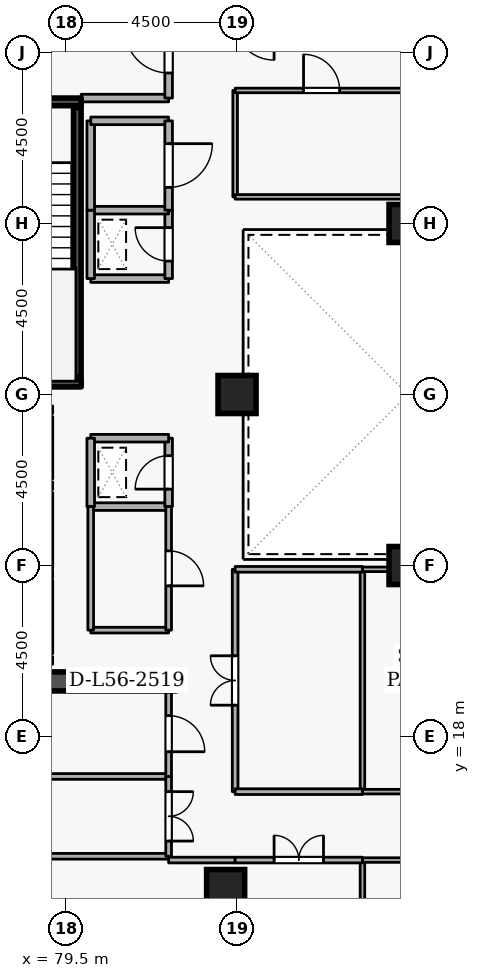
"""IFC4 building model, lengths in metres.
Left out: names, types, materials, properties, quantities, classifications, styles, units other than length and angle.
Written with IfcOpenShell. Run it as: python <this file> out.ifc"""

import sys

from ifc_helpers import new_model, si_unit, direction, frame, frame_2d, origin, origin_2d, place, context, subcontext, project, spatial, rectangle, extrude, element, fill, save


model = new_model("IFC4")
c1 = context("Model", 3, precision=1e-05, world=origin(), true_north=direction((0.0, 1.0)))
c2 = subcontext(c1, "Body", "Model", "MODEL_VIEW")
j1 = project(units=[si_unit("LENGTHUNIT", "METRE"), si_unit("PLANEANGLEUNIT", "RADIAN")], contexts=[c1])
p1 = place(None, origin())
s1 = spatial("IfcSite", under=j1, at=p1, CompositionType="ELEMENT")
p2 = place(p1, origin())
s2 = spatial("IfcBuilding", under=s1, at=p2, CompositionType="ELEMENT")
p3 = place(p2, frame((0.0, 0.0, 210.9)))
s3 = spatial("IfcBuildingStorey", under=s2, at=p3, CompositionType="ELEMENT", Elevation=210.9)
p4 = place(p3, frame((76.6, 19.45, 0.0), z_axis=(0.0, 0.0, 1.0), x_axis=(1.0, 0.0, 0.0)))
e1 = element("IfcWall", 1, at=p4, inside=s3, PredefinedType="SHEAR", context=c2, shape_type="SweptSolid", body=[
    extrude(rectangle(XDim=5.8, YDim=0.5, at=frame_2d((2.9, 0.0))), origin(), (0.0, 0.0, 1.0), 3.6),
])
for number, where, z_axis, x_axis in (
    (2, (83.7, 14.0, 0.0), (0.0, 0.0, 1.0), (1.0, 0.0, 0.0)),
    (3, (84.0, 27.0, 0.0), (0.0, 0.0, 1.0), (1.0, 0.0, 0.0)),
    (4, (88.5, 22.5, 0.0), (0.0, 0.0, 1.0), (1.0, 0.0, 0.0)),
    (5, (88.5, 31.5, 0.0), (0.0, 0.0, 1.0), (1.0, 0.0, 0.0)),
):
    element("IfcColumn", number, at=place(p3, frame(where, z_axis=z_axis, x_axis=x_axis)), inside=s3, PredefinedType="COLUMN", context=c2, shape_type="SweptSolid", body=[
        extrude(rectangle(XDim=1.0, YDim=1.0, at=origin_2d()), origin(), (0.0, 0.0, 1.0), 3.6),
    ])
p5 = place(p3, frame((79.05, 24.78, 0.0), z_axis=(0.0, 0.0, 1.0), x_axis=(0.0, 1.0, 0.0)))
e6 = element("IfcWall", 6, at=p5, inside=s3, PredefinedType="STANDARD", context=c2, shape_type="SweptSolid", body=[
    extrude(rectangle(XDim=1.64, YDim=0.2, at=frame_2d((0.82, 0.0))), origin(), (0.0, 0.0, 1.0), 3.34),
])
p6 = place(p5, frame((0.31, 0.0, 0.0)))
e7 = element("IfcOpeningElement", 7, at=p6, cuts=e6, PredefinedType="OPENING", context=c2, shape_type="SweptSolid", body=[
    extrude(rectangle(XDim=1.02, YDim=2.06, at=frame_2d((0.51, 1.03))), frame((0.0, 0.11, 0.0), z_axis=(0.0, -1.0, 0.0), x_axis=(1.0, 0.0, 0.0)), (0.0, 0.0, 1.0), 0.22),
])
p7 = place(p3, frame((79.05, 22.43, 0.0), z_axis=(0.0, 0.0, 1.0), x_axis=(0.0, 1.0, 0.0)))
e8 = element("IfcWall", 8, at=p7, inside=s3, PredefinedType="STANDARD", context=c2, shape_type="SweptSolid", body=[
    extrude(rectangle(XDim=1.99, YDim=0.2, at=frame_2d((0.995, 0.0))), origin(), (0.0, 0.0, 1.0), 3.34),
])
p8 = place(p7, frame((0.485, 0.0, 0.0)))
e9 = element("IfcOpeningElement", 9, at=p8, cuts=e8, PredefinedType="OPENING", context=c2, shape_type="SweptSolid", body=[
    extrude(rectangle(XDim=1.02, YDim=2.06, at=frame_2d((0.51, 1.03))), frame((0.0, 0.11, 0.0), z_axis=(0.0, -1.0, 0.0), x_axis=(1.0, 0.0, 0.0)), (0.0, 0.0, 1.0), 0.22),
])
p9 = place(p3, frame((79.05, 20.18, 0.0), z_axis=(0.0, 0.0, 1.0), x_axis=(0.0, 1.0, 0.0)))
e10 = element("IfcWall", 10, at=p9, inside=s3, PredefinedType="STANDARD", context=c2, shape_type="SweptSolid", body=[
    extrude(rectangle(XDim=1.94, YDim=0.2, at=frame_2d((0.97, 0.0))), origin(), (0.0, 0.0, 1.0), 3.34),
])
p10 = place(p9, frame((0.46, 0.0, 0.0)))
e11 = element("IfcOpeningElement", 11, at=p10, cuts=e10, PredefinedType="OPENING", context=c2, shape_type="SweptSolid", body=[
    extrude(rectangle(XDim=1.02, YDim=2.06, at=frame_2d((0.51, 1.03))), frame((0.0, 0.11, 0.0), z_axis=(0.0, -1.0, 0.0), x_axis=(1.0, 0.0, 0.0)), (0.0, 0.0, 1.0), 0.22),
])
p11 = place(p3, frame((76.55, 34.7, 0.0), z_axis=(0.0, 0.0, 1.0), x_axis=(1.0, 0.0, 0.0)))
e12 = element("IfcWall", 12, at=p11, inside=s3, PredefinedType="SHEAR", context=c2, shape_type="SweptSolid", body=[
    extrude(rectangle(XDim=3.35, YDim=0.2, at=frame_2d((1.675, 0.0))), origin(), (0.0, 0.0, 1.0), 3.6),
])
p12 = place(p11, frame((1.125, 0.0, 0.0)))
e13 = element("IfcOpeningElement", 13, at=p12, cuts=e12, PredefinedType="OPENING", context=c2, shape_type="SweptSolid", body=[
    extrude(rectangle(XDim=1.1, YDim=2.1, at=frame_2d((0.55, 1.05))), frame((0.0, 0.11, 0.0), z_axis=(0.0, -1.0, 0.0), x_axis=(1.0, 0.0, 0.0)), (0.0, 0.0, 1.0), 0.22),
])
p13 = place(p3, frame((79.9, 27.3, 0.0), z_axis=(0.0, 0.0, 1.0), x_axis=(-1.0, 0.0, 0.0)))
e14 = element("IfcWall", 14, at=p13, inside=s3, PredefinedType="SHEAR", context=c2, shape_type="SweptSolid", body=[
    extrude(rectangle(XDim=3.35, YDim=0.2, at=frame_2d((1.675, 0.0))), origin(), (0.0, 0.0, 1.0), 3.6),
])
p14 = place(p3, frame((79.797, 27.45, 0.0), z_axis=(0.0, 0.0, 1.0), x_axis=(0.0, 1.0, 0.0)))
e15 = element("IfcWall", 15, at=p14, inside=s3, PredefinedType="SHEAR", context=c2, shape_type="SweptSolid", body=[
    extrude(rectangle(XDim=7.1, YDim=0.2, at=frame_2d((3.55, 0.0))), origin(), (0.0, 0.0, 1.0), 3.6),
])
p15 = place(p3, frame((79.9, 34.8, 0.0), z_axis=(0.0, 0.0, 1.0), x_axis=(1.0, 0.0, 0.0)))
e16 = element("IfcWall", 16, at=p15, inside=s3, PredefinedType="STANDARD", context=c2, shape_type="SweptSolid", body=[
    extrude(rectangle(XDim=2.3, YDim=0.2, at=frame_2d((1.15, 0.0))), origin(), (0.0, 0.0, 1.0), 2.545),
])
p16 = place(p3, frame((82.2, 34.8, 0.0), z_axis=(0.0, 0.0, 1.0), x_axis=(0.0, 1.0, 0.0)))
e17 = element("IfcWall", 17, at=p16, inside=s3, PredefinedType="STANDARD", context=c2, shape_type="SweptSolid", body=[
    extrude(rectangle(XDim=2.5, YDim=0.2, at=frame_2d((1.25, 0.0))), origin(), (0.0, 0.0, 1.0), 3.34),
])
p17 = place(p16, frame((0.66, 0.0, 0.0)))
e18 = element("IfcOpeningElement", 18, at=p17, cuts=e17, PredefinedType="OPENING", context=c2, shape_type="SweptSolid", body=[
    extrude(rectangle(XDim=1.15, YDim=2.1, at=frame_2d((0.575, 1.05))), frame((0.0, 0.11, 0.0), z_axis=(0.0, -1.0, 0.0), x_axis=(1.0, 0.0, 0.0)), (0.0, 0.0, 1.0), 0.22),
])
p18 = place(p3, frame((80.15, 24.05, 0.0), z_axis=(0.0, 0.0, 1.0), x_axis=(1.0, 0.0, 0.0)))
e19 = element("IfcWall", 19, at=p18, inside=s3, PredefinedType="STANDARD", context=c2, shape_type="SweptSolid", body=[
    extrude(rectangle(XDim=2.05, YDim=0.2, at=frame_2d((1.025, 0.0))), origin(), (0.0, 0.0, 1.0), 3.34),
])
p19 = place(p3, frame((82.2, 24.05, 0.0), z_axis=(0.0, 0.0, 1.0), x_axis=(0.0, 1.0, 0.0)))
e20 = element("IfcWall", 20, at=p19, inside=s3, PredefinedType="STANDARD", context=c2, shape_type="SweptSolid", body=[
    extrude(rectangle(XDim=1.8, YDim=0.2, at=frame_2d((0.9, 0.0))), origin(), (0.0, 0.0, 1.0), 3.34),
])
p20 = place(p19, frame((0.46, 0.0, 0.0)))
e21 = element("IfcOpeningElement", 21, at=p20, cuts=e20, PredefinedType="OPENING", context=c2, shape_type="SweptSolid", body=[
    extrude(rectangle(XDim=0.88, YDim=2.04, at=frame_2d((0.44, 1.02))), frame((0.0, 0.11, 0.0), z_axis=(0.0, -1.0, 0.0), x_axis=(1.0, 0.0, 0.0)), (0.0, 0.0, 1.0), 0.22),
])
p21 = place(p3, frame((82.2, 25.85, 0.0), z_axis=(0.0, 0.0, 1.0), x_axis=(-1.0, 0.0, 0.0)))
e22 = element("IfcWall", 22, at=p21, inside=s3, PredefinedType="STANDARD", context=c2, shape_type="SweptSolid", body=[
    extrude(rectangle(XDim=2.05, YDim=0.2, at=frame_2d((1.025, 0.0))), origin(), (0.0, 0.0, 1.0), 3.34),
])
p22 = place(p3, frame((80.15, 25.85, 0.0), z_axis=(0.0, 0.0, 1.0), x_axis=(0.0, -1.0, 0.0)))
e23 = element("IfcWall", 23, at=p22, inside=s3, PredefinedType="STANDARD", context=c2, shape_type="SweptSolid", body=[
    extrude(rectangle(XDim=1.8, YDim=0.2, at=frame_2d((0.9, 0.0))), origin(), (0.0, 0.0, 1.0), 3.34),
])
p23 = place(p3, frame((80.15, 30.05, 0.0), z_axis=(0.0, 0.0, 1.0), x_axis=(1.0, 0.0, 0.0)))
e24 = element("IfcWall", 24, at=p23, inside=s3, PredefinedType="STANDARD", context=c2, shape_type="SweptSolid", body=[
    extrude(rectangle(XDim=2.05, YDim=0.2, at=frame_2d((1.025, 0.0))), origin(), (0.0, 0.0, 1.0), 3.34),
])
p24 = place(p3, frame((82.2, 30.05, 0.0), z_axis=(0.0, 0.0, 1.0), x_axis=(0.0, 1.0, 0.0)))
e25 = element("IfcWall", 25, at=p24, inside=s3, PredefinedType="STANDARD", context=c2, shape_type="SweptSolid", body=[
    extrude(rectangle(XDim=1.8, YDim=0.2, at=frame_2d((0.9, 0.0))), origin(), (0.0, 0.0, 1.0), 3.34),
])
p25 = place(p24, frame((0.46, 0.0, 0.0)))
e26 = element("IfcOpeningElement", 26, at=p25, cuts=e25, PredefinedType="OPENING", context=c2, shape_type="SweptSolid", body=[
    extrude(rectangle(XDim=0.88, YDim=2.04, at=frame_2d((0.44, 1.02))), frame((0.0, 0.11, 0.0), z_axis=(0.0, -1.0, 0.0), x_axis=(1.0, 0.0, 0.0)), (0.0, 0.0, 1.0), 0.22),
])
p26 = place(p3, frame((82.2, 31.85, 0.0), z_axis=(0.0, 0.0, 1.0), x_axis=(-1.0, 0.0, 0.0)))
e27 = element("IfcWall", 27, at=p26, inside=s3, PredefinedType="STANDARD", context=c2, shape_type="SweptSolid", body=[
    extrude(rectangle(XDim=2.05, YDim=0.2, at=frame_2d((1.025, 0.0))), origin(), (0.0, 0.0, 1.0), 3.34),
])
p27 = place(p3, frame((80.15, 31.85, 0.0), z_axis=(0.0, 0.0, 1.0), x_axis=(0.0, -1.0, 0.0)))
e28 = element("IfcWall", 28, at=p27, inside=s3, PredefinedType="STANDARD", context=c2, shape_type="SweptSolid", body=[
    extrude(rectangle(XDim=1.8, YDim=0.2, at=frame_2d((0.9, 0.0))), origin(), (0.0, 0.0, 1.0), 3.34),
])
p28 = place(p3, frame((80.15, 31.85, 0.0), z_axis=(0.0, 0.0, 1.0), x_axis=(0.0, 1.0, 0.0)))
e29 = element("IfcWall", 29, at=p28, inside=s3, PredefinedType="STANDARD", context=c2, shape_type="SweptSolid", body=[
    extrude(rectangle(XDim=2.35, YDim=0.2, at=frame_2d((1.175, 0.0))), origin(), (0.0, 0.0, 1.0), 3.34),
])
p29 = place(p3, frame((80.15, 34.2, 0.0), z_axis=(0.0, 0.0, 1.0), x_axis=(1.0, 0.0, 0.0)))
e30 = element("IfcWall", 30, at=p29, inside=s3, PredefinedType="STANDARD", context=c2, shape_type="SweptSolid", body=[
    extrude(rectangle(XDim=2.05, YDim=0.2, at=frame_2d((1.025, 0.0))), origin(), (0.0, 0.0, 1.0), 2.545),
])
p30 = place(p3, frame((82.2, 34.2, 0.0), z_axis=(0.0, 0.0, 1.0), x_axis=(0.0, -1.0, 0.0)))
e31 = element("IfcWall", 31, at=p30, inside=s3, PredefinedType="STANDARD", context=c2, shape_type="SweptSolid", body=[
    extrude(rectangle(XDim=2.35, YDim=0.2, at=frame_2d((1.175, 0.0))), origin(), (0.0, 0.0, 1.0), 3.34),
])
p31 = place(p30, frame((0.6, 0.0, 0.0)))
e32 = element("IfcOpeningElement", 32, at=p31, cuts=e31, PredefinedType="OPENING", context=c2, shape_type="SweptSolid", body=[
    extrude(rectangle(XDim=1.15, YDim=2.1, at=frame_2d((0.575, 1.05))), frame((0.0, 0.11, 0.0), z_axis=(0.0, -1.0, 0.0), x_axis=(1.0, 0.0, 0.0)), (0.0, 0.0, 1.0), 0.22),
])
p32 = place(p3, frame((82.2, 20.8, 0.0), z_axis=(0.0, 0.0, 1.0), x_axis=(-1.0, 0.0, 0.0)))
e33 = element("IfcWall", 33, at=p32, inside=s3, PredefinedType="PARTITIONING", context=c2, shape_type="SweptSolid", body=[
    extrude(rectangle(XDim=2.05, YDim=0.15, at=frame_2d((1.025, 0.0))), origin(), (0.0, 0.0, 1.0), 3.34),
])
p33 = place(p3, frame((80.15, 20.8, 0.0), z_axis=(0.0, 0.0, 1.0), x_axis=(0.0, 1.0, 0.0)))
e34 = element("IfcWall", 34, at=p33, inside=s3, PredefinedType="PARTITIONING", context=c2, shape_type="SweptSolid", body=[
    extrude(rectangle(XDim=3.25, YDim=0.15, at=frame_2d((1.625, 0.0))), origin(), (0.0, 0.0, 1.0), 3.34),
])
p34 = place(p3, frame((82.2, 24.05, 0.0), z_axis=(0.0, 0.0, 1.0), x_axis=(0.0, -1.0, 0.0)))
e35 = element("IfcWall", 35, at=p34, inside=s3, PredefinedType="PARTITIONING", context=c2, shape_type="SweptSolid", body=[
    extrude(rectangle(XDim=3.25, YDim=0.15, at=frame_2d((1.625, 0.0))), origin(), (0.0, 0.0, 1.0), 3.34),
])
p35 = place(p34, frame((1.165, 0.0, 0.0)))
e36 = element("IfcOpeningElement", 36, at=p35, cuts=e35, PredefinedType="OPENING", context=c2, shape_type="SweptSolid", body=[
    extrude(rectangle(XDim=0.92, YDim=2.08, at=frame_2d((0.46, 1.04))), frame((0.0, 0.085, 0.0), z_axis=(0.0, -1.0, 0.0), x_axis=(1.0, 0.0, 0.0)), (0.0, 0.0, 1.0), 0.17),
])
for number, where, z_axis, x_axis in (
    (37, (82.2, 14.85, 0.0), (0.0, 0.0, 1.0), (-1.0, 0.0, 0.0)),
    (38, (64.78, 16.95, 0.0), (0.0, 0.0, 1.0), (1.0, 0.0, 0.0)),
):
    element("IfcWall", number, at=place(p3, frame(where, z_axis=z_axis, x_axis=x_axis)), inside=s3, PredefinedType="PARTITIONING", context=c2, shape_type="SweptSolid", body=[
        extrude(rectangle(XDim=17.42, YDim=0.15, at=frame_2d((8.71, 0.0))), origin(), (0.0, 0.0, 1.0), 3.34),
    ])
p36 = place(p3, frame((82.2, 16.95, 0.0), z_axis=(0.0, 0.0, 1.0), x_axis=(0.0, -1.0, 0.0)))
e39 = element("IfcWall", 39, at=p36, inside=s3, PredefinedType="PARTITIONING", context=c2, shape_type="SweptSolid", body=[
    extrude(rectangle(XDim=2.1, YDim=0.15, at=frame_2d((1.05, 0.0))), origin(), (0.0, 0.0, 1.0), 3.34),
])
p37 = place(p36, frame((0.4, 0.0, 0.0)))
e40 = element("IfcOpeningElement", 40, at=p37, cuts=e39, PredefinedType="OPENING", context=c2, shape_type="SweptSolid", body=[
    extrude(rectangle(XDim=1.3, YDim=2.12, at=frame_2d((0.65, 1.06))), frame((0.0, 0.085, 0.0), z_axis=(0.0, -1.0, 0.0), x_axis=(1.0, 0.0, 0.0)), (0.0, 0.0, 1.0), 0.17),
])
p38 = place(p3, frame((82.2, 19.2, 0.0), z_axis=(0.0, 0.0, 1.0), x_axis=(0.0, -1.0, 0.0)))
e41 = element("IfcWall", 41, at=p38, inside=s3, PredefinedType="PARTITIONING", context=c2, shape_type="SweptSolid", body=[
    extrude(rectangle(XDim=2.25, YDim=0.15, at=frame_2d((1.125, 0.0))), origin(), (0.0, 0.0, 1.0), 3.34),
])
p39 = place(p38, frame((0.65, 0.0, 0.0)))
e42 = element("IfcOpeningElement", 42, at=p39, cuts=e41, PredefinedType="OPENING", context=c2, shape_type="SweptSolid", body=[
    extrude(rectangle(XDim=0.95, YDim=2.1, at=frame_2d((0.475, 1.05))), frame((0.0, 0.085, 0.0), z_axis=(0.0, -1.0, 0.0), x_axis=(1.0, 0.0, 0.0)), (0.0, 0.0, 1.0), 0.17),
])
p40 = place(p3, frame((87.3, 3.28, 0.0), z_axis=(0.0, 0.0, 1.0), x_axis=(0.0, 1.0, 0.0)))
e43 = element("IfcWall", 43, at=p40, inside=s3, PredefinedType="PARTITIONING", context=c2, shape_type="SweptSolid", body=[
    extrude(rectangle(XDim=11.47, YDim=0.12, at=frame_2d((5.735, 0.0))), origin(), (0.0, 0.0, 1.0), 3.34),
])
p41 = place(p3, frame((87.3, 14.75, 0.0), z_axis=(0.0, 0.0, 1.0), x_axis=(1.0, 0.0, 0.0)))
e44 = element("IfcWall", 44, at=p41, inside=s3, PredefinedType="PARTITIONING", context=c2, shape_type="SweptSolid", body=[
    extrude(rectangle(XDim=5.75, YDim=0.12, at=frame_2d((2.875, 0.0))), origin(), (0.0, 0.0, 1.0), 3.34),
])
p42 = place(p41, frame((2.35, 0.0, 0.0)))
e45 = element("IfcOpeningElement", 45, at=p42, cuts=e44, PredefinedType="OPENING", context=c2, shape_type="SweptSolid", body=[
    extrude(rectangle(XDim=1.05, YDim=2.1, at=frame_2d((0.525, 1.05))), frame((0.0, 0.07, 0.0), z_axis=(0.0, -1.0, 0.0), x_axis=(1.0, 0.0, 0.0)), (0.0, 0.0, 1.0), 0.14),
])
p43 = place(p3, frame((82.2, 14.75, 0.0), z_axis=(0.0, 0.0, 1.0), x_axis=(1.0, 0.0, 0.0)))
e46 = element("IfcWall", 46, at=p43, inside=s3, PredefinedType="PARTITIONING", context=c2, shape_type="SweptSolid", body=[
    extrude(rectangle(XDim=1.75, YDim=0.15, at=frame_2d((0.875, 0.0))), origin(), (0.0, 0.0, 1.0), 3.34),
])
p44 = place(p3, frame((83.95, 14.75, 0.0), z_axis=(0.0, 0.0, 1.0), x_axis=(1.0, 0.0, 0.0)))
e47 = element("IfcWall", 47, at=p44, inside=s3, PredefinedType="PARTITIONING", context=c2, shape_type="SweptSolid", body=[
    extrude(rectangle(XDim=3.35, YDim=0.15, at=frame_2d((1.675, 0.0))), origin(), (0.0, 0.0, 1.0), 3.34),
])
p45 = place(p44, frame((1.025, 0.0, 0.0)))
e48 = element("IfcOpeningElement", 48, at=p45, cuts=e47, PredefinedType="OPENING", context=c2, shape_type="SweptSolid", body=[
    extrude(rectangle(XDim=1.3, YDim=2.12, at=frame_2d((0.65, 1.06))), frame((0.0, 0.085, 0.0), z_axis=(0.0, -1.0, 0.0), x_axis=(1.0, 0.0, 0.0)), (0.0, 0.0, 1.0), 0.17),
])
p46 = place(p3, frame((87.3, 16.55, 0.0), z_axis=(0.0, 0.0, 1.0), x_axis=(0.0, 1.0, 0.0)))
e49 = element("IfcWall", 49, at=p46, inside=s3, PredefinedType="PARTITIONING", context=c2, shape_type="SweptSolid", body=[
    extrude(rectangle(XDim=5.85, YDim=0.12, at=frame_2d((2.925, 0.0))), origin(), (0.0, 0.0, 1.0), 3.34),
])
for number, where, z_axis, x_axis in (
    (50, (87.3, 22.4, 0.0), (0.0, 0.0, 1.0), (1.0, 0.0, 0.0)),
    (51, (93.05, 16.55, 0.0), (0.0, 0.0, 1.0), (-1.0, 0.0, 0.0)),
):
    element("IfcWall", number, at=place(p3, frame(where, z_axis=z_axis, x_axis=x_axis)), inside=s3, PredefinedType="PARTITIONING", context=c2, shape_type="SweptSolid", body=[
        extrude(rectangle(XDim=5.75, YDim=0.12, at=frame_2d((2.875, 0.0))), origin(), (0.0, 0.0, 1.0), 3.34),
    ])
p47 = place(p3, frame((83.95, 16.55, 0.0), z_axis=(0.0, 0.0, 1.0), x_axis=(0.0, 1.0, 0.0)))
e52 = element("IfcWall", 52, at=p47, inside=s3, PredefinedType="PARTITIONING", context=c2, shape_type="SweptSolid", body=[
    extrude(rectangle(XDim=5.85, YDim=0.15, at=frame_2d((2.925, 0.0))), origin(), (0.0, 0.0, 1.0), 3.34),
])
p48 = place(p47, frame((2.275, 0.0, 0.0)))
e53 = element("IfcOpeningElement", 53, at=p48, cuts=e52, PredefinedType="OPENING", context=c2, shape_type="SweptSolid", body=[
    extrude(rectangle(XDim=1.3, YDim=2.12, at=frame_2d((0.65, 1.06))), frame((0.0, 0.085, 0.0), z_axis=(0.0, -1.0, 0.0), x_axis=(1.0, 0.0, 0.0)), (0.0, 0.0, 1.0), 0.17),
])
for number, where, z_axis, x_axis in (
    (54, (83.95, 22.4, 0.0), (0.0, 0.0, 1.0), (1.0, 0.0, 0.0)),
    (55, (87.3, 16.55, 0.0), (0.0, 0.0, 1.0), (-1.0, 0.0, 0.0)),
):
    element("IfcWall", number, at=place(p3, frame(where, z_axis=z_axis, x_axis=x_axis)), inside=s3, PredefinedType="PARTITIONING", context=c2, shape_type="SweptSolid", body=[
        extrude(rectangle(XDim=3.35, YDim=0.15, at=frame_2d((1.675, 0.0))), origin(), (0.0, 0.0, 1.0), 3.34),
    ])
p49 = place(p3, frame((83.95, 32.2, 0.0), z_axis=(0.0, 0.0, 1.0), x_axis=(0.0, 1.0, 0.0)))
e56 = element("IfcWall", 56, at=p49, inside=s3, PredefinedType="PARTITIONING", context=c2, shape_type="SweptSolid", body=[
    extrude(rectangle(XDim=2.8, YDim=0.12, at=frame_2d((1.4, 0.0))), origin(), (0.0, 0.0, 1.0), 3.34),
])
p50 = place(p3, frame((83.95, 35.0, 0.0), z_axis=(0.0, 0.0, 1.0), x_axis=(1.0, 0.0, 0.0)))
e57 = element("IfcWall", 57, at=p50, inside=s3, PredefinedType="PARTITIONING", context=c2, shape_type="SweptSolid", body=[
    extrude(rectangle(XDim=4.55, YDim=0.12, at=frame_2d((2.275, 0.0))), origin(), (0.0, 0.0, 1.0), 3.34),
])
p51 = place(p50, frame((1.8, 0.0, 0.0)))
e58 = element("IfcOpeningElement", 58, at=p51, cuts=e57, PredefinedType="OPENING", context=c2, shape_type="SweptSolid", body=[
    extrude(rectangle(XDim=0.95, YDim=2.1, at=frame_2d((0.475, 1.05))), frame((0.0, 0.07, 0.0), z_axis=(0.0, -1.0, 0.0), x_axis=(1.0, 0.0, 0.0)), (0.0, 0.0, 1.0), 0.14),
])
p52 = place(p3, frame((88.5, 32.2, 0.0), z_axis=(0.0, 0.0, 1.0), x_axis=(-1.0, 0.0, 0.0)))
e59 = element("IfcWall", 59, at=p52, inside=s3, PredefinedType="PARTITIONING", context=c2, shape_type="SweptSolid", body=[
    extrude(rectangle(XDim=4.55, YDim=0.12, at=frame_2d((2.275, 0.0))), origin(), (0.0, 0.0, 1.0), 3.34),
])
p53 = place(p17, origin())
e60 = element("IfcDoor", 60, at=p53, inside=s3, OperationType="SINGLE_SWING_RIGHT", PredefinedType="DOOR", context=c2, shape_type="SweptSolid", body=[
    extrude(rectangle(XDim=1.15, YDim=2.1, at=frame_2d((0.575, 1.05))), frame((0.0, 0.025, 0.0), z_axis=(0.0, -1.0, 0.0), x_axis=(1.0, 0.0, 0.0)), (0.0, 0.0, 1.0), 0.05),
])
fill(e18, e60)
p54 = place(p20, origin())
e61 = element("IfcDoor", 61, at=p54, inside=s3, OperationType="SINGLE_SWING_LEFT", PredefinedType="DOOR", context=c2, shape_type="SweptSolid", body=[
    extrude(rectangle(XDim=0.88, YDim=2.04, at=frame_2d((0.44, 1.02))), frame((0.0, 0.025, 0.0), z_axis=(0.0, -1.0, 0.0), x_axis=(1.0, 0.0, 0.0)), (0.0, 0.0, 1.0), 0.05),
])
fill(e21, e61)
p55 = place(p25, origin())
e62 = element("IfcDoor", 62, at=p55, inside=s3, OperationType="SINGLE_SWING_RIGHT", PredefinedType="DOOR", context=c2, shape_type="SweptSolid", body=[
    extrude(rectangle(XDim=0.88, YDim=2.04, at=frame_2d((0.44, 1.02))), frame((0.0, 0.025, 0.0), z_axis=(0.0, -1.0, 0.0), x_axis=(1.0, 0.0, 0.0)), (0.0, 0.0, 1.0), 0.05),
])
fill(e26, e62)
p56 = place(p35, origin())
e63 = element("IfcDoor", 63, at=p56, inside=s3, OperationType="SINGLE_SWING_RIGHT", PredefinedType="DOOR", context=c2, shape_type="SweptSolid", body=[
    extrude(rectangle(XDim=0.92, YDim=2.08, at=frame_2d((0.46, 1.04))), frame((0.0, 0.025, 0.0), z_axis=(0.0, -1.0, 0.0), x_axis=(1.0, 0.0, 0.0)), (0.0, 0.0, 1.0), 0.05),
])
fill(e36, e63)
p57 = place(p31, origin())
e64 = element("IfcDoor", 64, at=p57, inside=s3, OperationType="SINGLE_SWING_LEFT", PredefinedType="DOOR", context=c2, shape_type="SweptSolid", body=[
    extrude(rectangle(XDim=1.15, YDim=2.1, at=frame_2d((0.575, 1.05))), frame((0.0, 0.025, 0.0), z_axis=(0.0, -1.0, 0.0), x_axis=(1.0, 0.0, 0.0)), (0.0, 0.0, 1.0), 0.05),
])
fill(e32, e64)
p58 = place(p37, origin())
e65 = element("IfcDoor", 65, at=p58, inside=s3, OperationType="DOUBLE_DOOR_SINGLE_SWING", PredefinedType="DOOR", context=c2, shape_type="SweptSolid", body=[
    extrude(rectangle(XDim=1.3, YDim=2.12, at=frame_2d((0.65, 1.06))), frame((0.0, 0.025, 0.0), z_axis=(0.0, -1.0, 0.0), x_axis=(1.0, 0.0, 0.0)), (0.0, 0.0, 1.0), 0.05),
])
fill(e40, e65)
p59 = place(p39, origin())
e66 = element("IfcDoor", 66, at=p59, inside=s3, OperationType="SINGLE_SWING_RIGHT", PredefinedType="DOOR", context=c2, shape_type="SweptSolid", body=[
    extrude(rectangle(XDim=0.95, YDim=2.1, at=frame_2d((0.475, 1.05))), frame((0.0, 0.025, 0.0), z_axis=(0.0, -1.0, 0.0), x_axis=(1.0, 0.0, 0.0)), (0.0, 0.0, 1.0), 0.05),
])
fill(e42, e66)
p60 = place(p45, origin())
e67 = element("IfcDoor", 67, at=p60, inside=s3, OperationType="DOUBLE_DOOR_SINGLE_SWING", PredefinedType="DOOR", context=c2, shape_type="SweptSolid", body=[
    extrude(rectangle(XDim=1.3, YDim=2.12, at=frame_2d((0.65, 1.06))), frame((0.0, 0.025, 0.0), z_axis=(0.0, -1.0, 0.0), x_axis=(1.0, 0.0, 0.0)), (0.0, 0.0, 1.0), 0.05),
])
fill(e48, e67)
p61 = place(p48, origin())
e68 = element("IfcDoor", 68, at=p61, inside=s3, OperationType="DOUBLE_DOOR_SINGLE_SWING", PredefinedType="DOOR", context=c2, shape_type="SweptSolid", body=[
    extrude(rectangle(XDim=1.3, YDim=2.12, at=frame_2d((0.65, 1.06))), frame((0.0, 0.025, 0.0), z_axis=(0.0, -1.0, 0.0), x_axis=(1.0, 0.0, 0.0)), (0.0, 0.0, 1.0), 0.05),
])
fill(e53, e68)
p62 = place(p51, origin())
e69 = element("IfcDoor", 69, at=p62, inside=s3, OperationType="SINGLE_SWING_LEFT", PredefinedType="DOOR", context=c2, shape_type="SweptSolid", body=[
    extrude(rectangle(XDim=0.95, YDim=2.1, at=frame_2d((0.475, 1.05))), frame((0.0, 0.025, 0.0), z_axis=(0.0, -1.0, 0.0), x_axis=(1.0, 0.0, 0.0)), (0.0, 0.0, 1.0), 0.05),
])
fill(e58, e69)
save(model, sys.argv[1])
